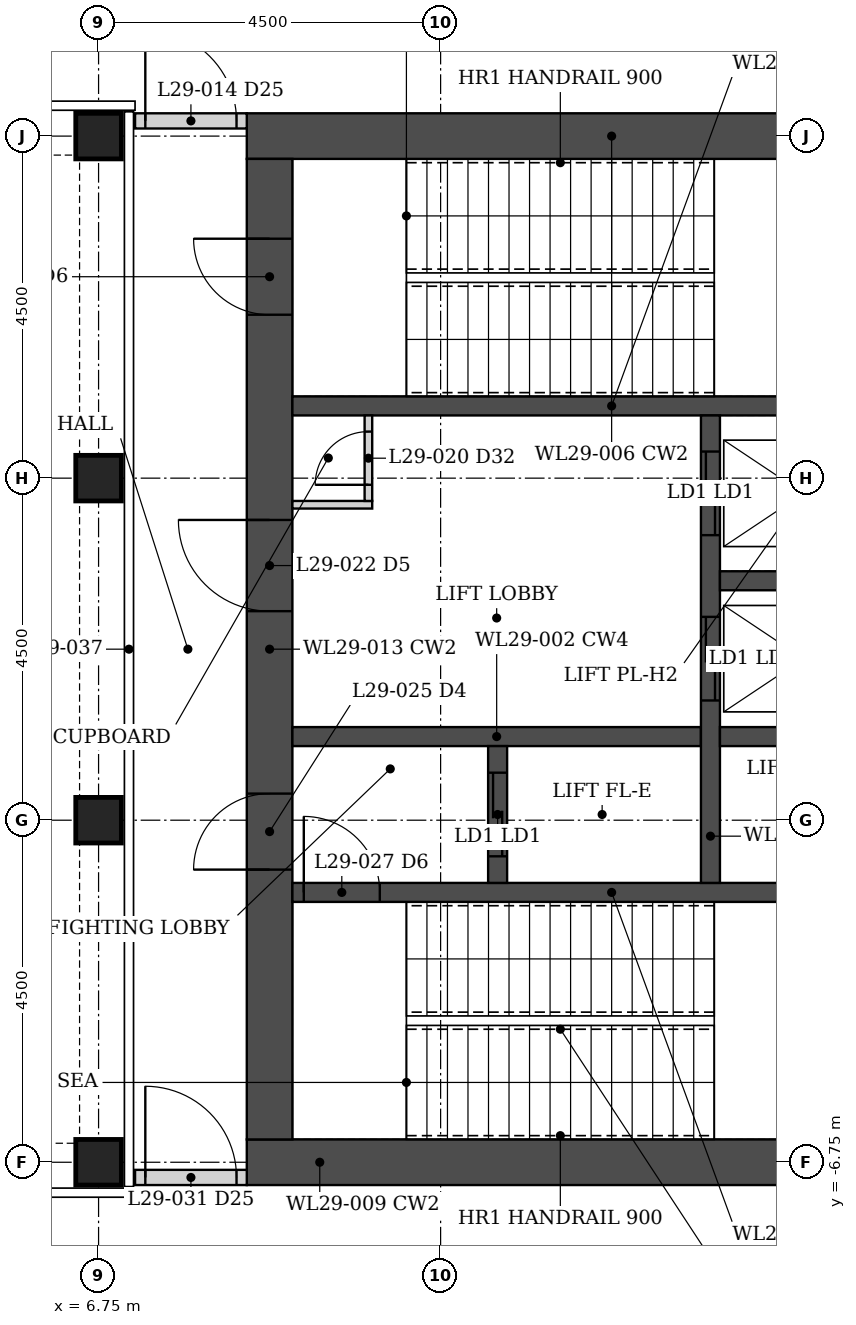
"""IFC4 building model, lengths in metres.
Left out: names, types, materials, properties, quantities, classifications, styles, units other than length and angle.
Written with IfcOpenShell. Run it as: python <this file> out.ifc"""

import sys

from ifc_helpers import new_model, si_unit, direction, frame, frame_2d, origin, origin_2d, place, context, subcontext, project, spatial, rectangle, hollow_rectangle, extrude, element, fill, save


model = new_model("IFC4")
c1 = context("Model", 3, precision=1e-05, world=origin(), true_north=direction((0.0, 1.0)))
c2 = subcontext(c1, "Body", "Model", "MODEL_VIEW")
j1 = project(units=[si_unit("LENGTHUNIT", "METRE"), si_unit("PLANEANGLEUNIT", "RADIAN")], contexts=[c1])
p1 = place(None, origin())
s1 = spatial("IfcSite", under=j1, at=p1, CompositionType="ELEMENT")
p2 = place(p1, origin())
s2 = spatial("IfcBuilding", under=s1, at=p2, CompositionType="ELEMENT")
p3 = place(p2, frame((0.0, 0.0, 112.4)))
s3 = spatial("IfcBuildingStorey", under=s2, at=p3, CompositionType="ELEMENT", Elevation=112.4)
for number, where, z_axis, x_axis in (
    (1, (6.75, -6.75, 0.0), (0.0, 0.0, 1.0), (1.0, 0.0, 0.0)),
    (2, (6.75, -2.25, 0.0), (0.0, 0.0, 1.0), (1.0, 0.0, 0.0)),
    (3, (6.75, 2.25, 0.0), (0.0, 0.0, 1.0), (1.0, 0.0, 0.0)),
    (4, (6.75, 6.75, 0.0), (0.0, 0.0, 1.0), (1.0, 0.0, 0.0)),
):
    element("IfcColumn", number, at=place(p3, frame(where, z_axis=z_axis, x_axis=x_axis)), inside=s3, PredefinedType="COLUMN", context=c2, shape_type="SweptSolid", body=[
        extrude(hollow_rectangle(XDim=0.6, YDim=0.6, WallThickness=0.04, at=origin_2d()), origin(), (0.0, 0.0, 1.0), 6.0),
    ])
for number, where, z_axis, x_axis in (
    (5, (8.7, -6.75, 0.0), (0.0, 0.0, 1.0), (1.0, 0.0, 0.0)),
    (6, (8.7, 6.75, 0.0), (0.0, 0.0, 1.0), (1.0, 0.0, 0.0)),
):
    element("IfcWall", number, at=place(p3, frame(where, z_axis=z_axis, x_axis=x_axis)), inside=s3, PredefinedType="SHEAR", context=c2, shape_type="SweptSolid", body=[
        extrude(rectangle(XDim=9.6, YDim=0.6, at=frame_2d((4.8, 0.0))), origin(), (0.0, 0.0, 1.0), 6.0),
    ])
p4 = place(p3, frame((9.0, -6.45, 0.0), z_axis=(0.0, 0.0, 1.0), x_axis=(0.0, 1.0, 0.0)))
e7 = element("IfcWall", 7, at=p4, inside=s3, PredefinedType="SHEAR", context=c2, shape_type="SweptSolid", body=[
    extrude(rectangle(XDim=12.9, YDim=0.6, at=frame_2d((6.45, 0.0))), origin(), (0.0, 0.0, 1.0), 6.0),
])
p5 = place(p4, frame((3.55, 0.0, 0.0)))
e8 = element("IfcOpeningElement", 8, at=p5, cuts=e7, PredefinedType="OPENING", context=c2, shape_type="SweptSolid", body=[
    extrude(rectangle(XDim=1.0, YDim=2.1, at=frame_2d((0.5, 1.05))), frame((0.0, 0.31, 0.0), z_axis=(0.0, -1.0, 0.0), x_axis=(1.0, 0.0, 0.0)), (0.0, 0.0, 1.0), 0.62),
])
p6 = place(p4, frame((6.95, 0.0, 0.0)))
e9 = element("IfcOpeningElement", 9, at=p6, cuts=e7, PredefinedType="OPENING", context=c2, shape_type="SweptSolid", body=[
    extrude(rectangle(XDim=1.2, YDim=2.1, at=frame_2d((0.6, 1.05))), frame((0.0, 0.31, 0.0), z_axis=(0.0, -1.0, 0.0), x_axis=(1.0, 0.0, 0.0)), (0.0, 0.0, 1.0), 0.62),
])
p7 = place(p4, frame((10.85, 0.0, 0.0)))
e10 = element("IfcOpeningElement", 10, at=p7, cuts=e7, PredefinedType="OPENING", context=c2, shape_type="SweptSolid", body=[
    extrude(rectangle(XDim=1.0, YDim=2.1, at=frame_2d((0.5, 1.05))), frame((0.0, 0.31, 0.0), z_axis=(0.0, -1.0, 0.0), x_axis=(1.0, 0.0, 0.0)), (0.0, 0.0, 1.0), 0.62),
])
p8 = place(p3, frame((9.3, -3.2, 0.0), z_axis=(0.0, 0.0, 1.0), x_axis=(1.0, 0.0, 0.0)))
e11 = element("IfcWall", 11, at=p8, inside=s3, PredefinedType="SHEAR", context=c2, shape_type="SweptSolid", body=[
    extrude(rectangle(XDim=8.4, YDim=0.25, at=frame_2d((4.2, 0.0))), origin(), (0.0, 0.0, 1.0), 6.0),
])
p9 = place(p8, frame((0.15, 0.0, 0.0)))
e12 = element("IfcOpeningElement", 12, at=p9, cuts=e11, PredefinedType="OPENING", context=c2, shape_type="SweptSolid", body=[
    extrude(rectangle(XDim=1.0, YDim=2.1, at=frame_2d((0.5, 1.05))), frame((0.0, 0.135, 0.0), z_axis=(0.0, -1.0, 0.0), x_axis=(1.0, 0.0, 0.0)), (0.0, 0.0, 1.0), 0.27),
])
p10 = place(p3, frame((9.3, 3.2, 0.0), z_axis=(0.0, 0.0, 1.0), x_axis=(1.0, 0.0, 0.0)))
e13 = element("IfcWall", 13, at=p10, inside=s3, PredefinedType="SHEAR", context=c2, shape_type="SweptSolid", body=[
    extrude(rectangle(XDim=8.4, YDim=0.25, at=frame_2d((4.2, 0.0))), origin(), (0.0, 0.0, 1.0), 6.0),
])
p11 = place(p3, frame((9.3, -1.15, 0.0), z_axis=(0.0, 0.0, 1.0), x_axis=(1.0, 0.0, 0.0)))
e14 = element("IfcWall", 14, at=p11, inside=s3, PredefinedType="SHEAR", context=c2, shape_type="SweptSolid", body=[
    extrude(rectangle(XDim=5.375, YDim=0.25, at=frame_2d((2.688, 0.0))), origin(), (0.0, 0.0, 1.0), 6.0),
])
p12 = place(p3, frame((12.0, -3.075, 0.0), z_axis=(0.0, 0.0, 1.0), x_axis=(0.0, 1.0, 0.0)))
e15 = element("IfcWall", 15, at=p12, inside=s3, PredefinedType="SHEAR", context=c2, shape_type="SweptSolid", body=[
    extrude(rectangle(XDim=1.8, YDim=0.25, at=frame_2d((0.9, 0.0))), origin(), (0.0, 0.0, 1.0), 6.0),
])
p13 = place(p12, frame((0.35, 0.0, 0.0)))
e16 = element("IfcOpeningElement", 16, at=p13, cuts=e15, PredefinedType="OPENING", context=c2, shape_type="SweptSolid", body=[
    extrude(rectangle(XDim=1.1, YDim=2.1, at=frame_2d((0.55, 1.05))), frame((0.0, 0.135, 0.0), z_axis=(0.0, -1.0, 0.0), x_axis=(1.0, 0.0, 0.0)), (0.0, 0.0, 1.0), 0.27),
])
p14 = place(p3, frame((14.8, -3.075, 0.0), z_axis=(0.0, 0.0, 1.0), x_axis=(0.0, 1.0, 0.0)))
e17 = element("IfcWall", 17, at=p14, inside=s3, PredefinedType="SHEAR", context=c2, shape_type="SweptSolid", body=[
    extrude(rectangle(XDim=6.15, YDim=0.25, at=frame_2d((3.075, 0.0))), origin(), (0.0, 0.0, 1.0), 6.0),
])
p15 = place(p14, frame((2.4, 0.0, 0.0)))
e18 = element("IfcOpeningElement", 18, at=p15, cuts=e17, PredefinedType="OPENING", context=c2, shape_type="SweptSolid", body=[
    extrude(rectangle(XDim=1.1, YDim=2.1, at=frame_2d((0.55, 1.05))), frame((0.0, 0.135, 0.0), z_axis=(0.0, -1.0, 0.0), x_axis=(1.0, 0.0, 0.0)), (0.0, 0.0, 1.0), 0.27),
])
p16 = place(p14, frame((4.575, 0.0, 0.0)))
e19 = element("IfcOpeningElement", 19, at=p16, cuts=e17, PredefinedType="OPENING", context=c2, shape_type="SweptSolid", body=[
    extrude(rectangle(XDim=1.1, YDim=2.1, at=frame_2d((0.55, 1.05))), frame((0.0, 0.135, 0.0), z_axis=(0.0, -1.0, 0.0), x_axis=(1.0, 0.0, 0.0)), (0.0, 0.0, 1.0), 0.27),
])
for number, where, z_axis, x_axis in (
    (20, (14.925, -1.15, 0.0), (0.0, 0.0, 1.0), (1.0, 0.0, 0.0)),
    (21, (14.925, 0.9, 0.0), (0.0, 0.0, 1.0), (1.0, 0.0, 0.0)),
):
    element("IfcWall", number, at=place(p3, frame(where, z_axis=z_axis, x_axis=x_axis)), inside=s3, PredefinedType="SHEAR", context=c2, shape_type="SweptSolid", body=[
        extrude(rectangle(XDim=2.775, YDim=0.25, at=frame_2d((1.387, 0.0))), origin(), (0.0, 0.0, 1.0), 6.0),
    ])
p17 = place(p3, frame((7.23, 6.95, 0.0), z_axis=(0.0, 0.0, 1.0), x_axis=(1.0, 0.0, 0.0)))
e22 = element("IfcWall", 22, at=p17, inside=s3, PredefinedType="PARTITIONING", context=c2, shape_type="SweptSolid", body=[
    extrude(rectangle(XDim=1.47, YDim=0.2, at=frame_2d((0.735, 0.0))), origin(), (0.0, 0.0, 1.0), 4.874),
])
p18 = place(p17, frame((0.135, 0.0, 0.0)))
e23 = element("IfcOpeningElement", 23, at=p18, cuts=e22, PredefinedType="OPENING", context=c2, shape_type="SweptSolid", body=[
    extrude(rectangle(XDim=1.2, YDim=2.1, at=frame_2d((0.6, 1.05))), frame((0.0, 0.11, 0.0), z_axis=(0.0, -1.0, 0.0), x_axis=(1.0, 0.0, 0.0)), (0.0, 0.0, 1.0), 0.22),
])
p19 = place(p3, frame((7.23, -6.95, 0.0), z_axis=(0.0, 0.0, 1.0), x_axis=(1.0, 0.0, 0.0)))
e24 = element("IfcWall", 24, at=p19, inside=s3, PredefinedType="PARTITIONING", context=c2, shape_type="SweptSolid", body=[
    extrude(rectangle(XDim=1.47, YDim=0.2, at=frame_2d((0.735, 0.0))), origin(), (0.0, 0.0, 1.0), 4.874),
])
p20 = place(p19, frame((0.135, 0.0, 0.0)))
e25 = element("IfcOpeningElement", 25, at=p20, cuts=e24, PredefinedType="OPENING", context=c2, shape_type="SweptSolid", body=[
    extrude(rectangle(XDim=1.2, YDim=2.1, at=frame_2d((0.6, 1.05))), frame((0.0, 0.11, 0.0), z_axis=(0.0, -1.0, 0.0), x_axis=(1.0, 0.0, 0.0)), (0.0, 0.0, 1.0), 0.22),
])
p21 = place(p3, frame((9.3, 1.9, 0.0), z_axis=(0.0, 0.0, 1.0), x_axis=(1.0, 0.0, 0.0)))
e26 = element("IfcWall", 26, at=p21, inside=s3, PredefinedType="PARTITIONING", context=c2, shape_type="SweptSolid", body=[
    extrude(rectangle(XDim=1.05, YDim=0.1, at=frame_2d((0.525, 0.0))), origin(), (0.0, 0.0, 1.0), 4.874),
])
p22 = place(p3, frame((10.3, 1.95, 0.0), z_axis=(0.0, 0.0, 1.0), x_axis=(0.0, 1.0, 0.0)))
e27 = element("IfcWall", 27, at=p22, inside=s3, PredefinedType="PARTITIONING", context=c2, shape_type="SweptSolid", body=[
    extrude(rectangle(XDim=1.125, YDim=0.1, at=frame_2d((0.562, 0.0))), origin(), (0.0, 0.0, 1.0), 4.874),
])
p23 = place(p22, frame((0.212, 0.0, 0.0)))
e28 = element("IfcOpeningElement", 28, at=p23, cuts=e27, PredefinedType="OPENING", context=c2, shape_type="SweptSolid", body=[
    extrude(rectangle(XDim=0.7, YDim=2.1, at=frame_2d((0.35, 1.05))), frame((0.0, 0.06, 0.0), z_axis=(0.0, -1.0, 0.0), x_axis=(1.0, 0.0, 0.0)), (0.0, 0.0, 1.0), 0.12),
])
p24 = place(p18, origin())
e29 = element("IfcDoor", 29, at=p24, inside=s3, OperationType="DOUBLE_DOOR_DOUBLE_SWING", PredefinedType="DOOR", context=c2, shape_type="SweptSolid", body=[
    extrude(rectangle(XDim=1.2, YDim=2.1, at=frame_2d((0.6, 1.05))), frame((0.0, 0.025, 0.0), z_axis=(0.0, -1.0, 0.0), x_axis=(1.0, 0.0, 0.0)), (0.0, 0.0, 1.0), 0.05),
])
fill(e23, e29)
p25 = place(p20, origin())
e30 = element("IfcDoor", 30, at=p25, inside=s3, OperationType="DOUBLE_DOOR_DOUBLE_SWING", PredefinedType="DOOR", context=c2, shape_type="SweptSolid", body=[
    extrude(rectangle(XDim=1.2, YDim=2.1, at=frame_2d((0.6, 1.05))), frame((0.0, 0.025, 0.0), z_axis=(0.0, -1.0, 0.0), x_axis=(1.0, 0.0, 0.0)), (0.0, 0.0, 1.0), 0.05),
])
fill(e25, e30)
p26 = place(p5, origin())
e31 = element("IfcDoor", 31, at=p26, inside=s3, OperationType="SINGLE_SWING_LEFT", PredefinedType="DOOR", context=c2, shape_type="SweptSolid", body=[
    extrude(rectangle(XDim=1.0, YDim=2.1, at=frame_2d((0.5, 1.05))), frame((0.0, 0.025, 0.0), z_axis=(0.0, -1.0, 0.0), x_axis=(1.0, 0.0, 0.0)), (0.0, 0.0, 1.0), 0.05),
])
fill(e8, e31)
p27 = place(p9, origin())
e32 = element("IfcDoor", 32, at=p27, inside=s3, OperationType="SINGLE_SWING_LEFT", PredefinedType="DOOR", context=c2, shape_type="SweptSolid", body=[
    extrude(rectangle(XDim=1.0, YDim=2.1, at=frame_2d((0.5, 1.05))), frame((0.0, 0.025, 0.0), z_axis=(0.0, -1.0, 0.0), x_axis=(1.0, 0.0, 0.0)), (0.0, 0.0, 1.0), 0.05),
])
fill(e12, e32)
p28 = place(p6, origin())
e33 = element("IfcDoor", 33, at=p28, inside=s3, OperationType="SINGLE_SWING_RIGHT", PredefinedType="DOOR", context=c2, shape_type="SweptSolid", body=[
    extrude(rectangle(XDim=1.2, YDim=2.1, at=frame_2d((0.6, 1.05))), frame((0.0, 0.025, 0.0), z_axis=(0.0, -1.0, 0.0), x_axis=(1.0, 0.0, 0.0)), (0.0, 0.0, 1.0), 0.05),
])
fill(e9, e33)
p29 = place(p23, origin())
e34 = element("IfcDoor", 34, at=p29, inside=s3, OperationType="SINGLE_SWING_LEFT", PredefinedType="DOOR", context=c2, shape_type="SweptSolid", body=[
    extrude(rectangle(XDim=0.7, YDim=2.1, at=frame_2d((0.35, 1.05))), frame((0.0, 0.025, 0.0), z_axis=(0.0, -1.0, 0.0), x_axis=(1.0, 0.0, 0.0)), (0.0, 0.0, 1.0), 0.05),
])
fill(e28, e34)
p30 = place(p7, origin())
e35 = element("IfcDoor", 35, at=p30, inside=s3, OperationType="SINGLE_SWING_RIGHT", PredefinedType="DOOR", context=c2, shape_type="SweptSolid", body=[
    extrude(rectangle(XDim=1.0, YDim=2.1, at=frame_2d((0.5, 1.05))), frame((0.0, 0.025, 0.0), z_axis=(0.0, -1.0, 0.0), x_axis=(1.0, 0.0, 0.0)), (0.0, 0.0, 1.0), 0.05),
])
fill(e10, e35)
p31 = place(p13, origin())
e36 = element("IfcDoor", 36, at=p31, inside=s3, OperationType="DOUBLE_DOOR_SLIDING", PredefinedType="DOOR", context=c2, shape_type="SweptSolid", body=[
    extrude(rectangle(XDim=1.1, YDim=2.1, at=frame_2d((0.55, 1.05))), frame((0.0, 0.025, 0.0), z_axis=(0.0, -1.0, 0.0), x_axis=(1.0, 0.0, 0.0)), (0.0, 0.0, 1.0), 0.05),
])
fill(e16, e36)
p32 = place(p15, origin())
e37 = element("IfcDoor", 37, at=p32, inside=s3, OperationType="DOUBLE_DOOR_SLIDING", PredefinedType="DOOR", context=c2, shape_type="SweptSolid", body=[
    extrude(rectangle(XDim=1.1, YDim=2.1, at=frame_2d((0.55, 1.05))), frame((0.0, 0.025, 0.0), z_axis=(0.0, -1.0, 0.0), x_axis=(1.0, 0.0, 0.0)), (0.0, 0.0, 1.0), 0.05),
])
fill(e18, e37)
p33 = place(p16, origin())
e38 = element("IfcDoor", 38, at=p33, inside=s3, OperationType="DOUBLE_DOOR_SLIDING", PredefinedType="DOOR", context=c2, shape_type="SweptSolid", body=[
    extrude(rectangle(XDim=1.1, YDim=2.1, at=frame_2d((0.55, 1.05))), frame((0.0, 0.025, 0.0), z_axis=(0.0, -1.0, 0.0), x_axis=(1.0, 0.0, 0.0)), (0.0, 0.0, 1.0), 0.05),
])
fill(e19, e38)
save(model, sys.argv[1])
